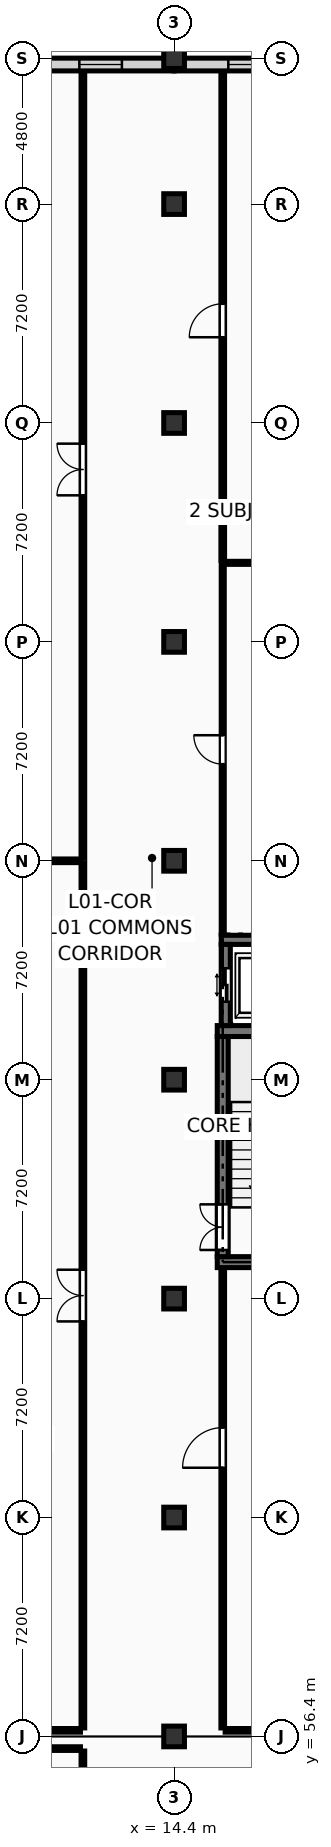
"""IFC4 building model, lengths in metres.
Left out: names, types, materials, properties, quantities, classifications, styles, units other than length and angle.
Written with IfcOpenShell. Run it as: python <this file> out.ifc"""

import sys

from ifc_helpers import new_model, si_unit, direction, frame, frame_2d, origin, origin_2d, place, context, subcontext, project, spatial, rectangle, extrude, element, fill, save


model = new_model("IFC4")
c1 = context("Model", 3, precision=1e-05, world=origin(), true_north=direction((0.0, 1.0)))
c2 = subcontext(c1, "Body", "Model", "MODEL_VIEW")
j1 = project(units=[si_unit("LENGTHUNIT", "METRE"), si_unit("PLANEANGLEUNIT", "RADIAN")], contexts=[c1])
p1 = place(None, origin())
s1 = spatial("IfcSite", under=j1, at=p1, CompositionType="ELEMENT")
p2 = place(p1, origin())
s2 = spatial("IfcBuilding", under=s1, at=p2, CompositionType="ELEMENT")
p3 = place(p2, frame((0.0, 0.0, 4.5)))
s3 = spatial("IfcBuildingStorey", under=s2, at=p3, CompositionType="ELEMENT", Elevation=4.5)
for number, where, z_axis, x_axis in (
    (1, (14.4, 56.4, 0.0), (0.0, 0.0, 1.0), (1.0, 0.0, 0.0)),
    (2, (14.4, 63.6, 0.0), (0.0, 0.0, 1.0), (1.0, 0.0, 0.0)),
    (3, (14.4, 70.8, 0.0), (0.0, 0.0, 1.0), (1.0, 0.0, 0.0)),
    (4, (14.4, 78.0, 0.0), (0.0, 0.0, 1.0), (1.0, 0.0, 0.0)),
    (5, (14.4, 85.2, 0.0), (0.0, 0.0, 1.0), (1.0, 0.0, 0.0)),
    (6, (14.4, 92.4, 0.0), (0.0, 0.0, 1.0), (1.0, 0.0, 0.0)),
    (7, (14.4, 99.6, 0.0), (0.0, 0.0, 1.0), (1.0, 0.0, 0.0)),
    (8, (14.4, 106.8, 0.0), (0.0, 0.0, 1.0), (1.0, 0.0, 0.0)),
    (9, (14.4, 111.6, 0.0), (0.0, 0.0, 1.0), (1.0, 0.0, 0.0)),
):
    element("IfcColumn", number, at=place(p3, frame(where, z_axis=z_axis, x_axis=x_axis)), inside=s3, PredefinedType="COLUMN", context=c2, shape_type="SweptSolid", body=[
        extrude(rectangle(XDim=0.68, YDim=0.68, at=origin_2d()), origin(), (0.0, 0.0, 1.0), 4.05),
    ])
p4 = place(p3, frame((7.2, 111.39, 0.0), z_axis=(0.0, 0.0, 1.0), x_axis=(1.0, 0.0, 0.0)))
e10 = element("IfcWall", 10, at=p4, inside=s3, PredefinedType="SOLIDWALL", context=c2, shape_type="SweptSolid", body=[
    extrude(rectangle(XDim=7.2, YDim=0.42, at=frame_2d((3.6, 0.0))), origin(), (0.0, 0.0, 1.0), 3.16),
])
p5 = place(p4, frame((1.717, 0.0, 0.45)))
e11 = element("IfcOpeningElement", 11, at=p5, cuts=e10, PredefinedType="OPENING", context=c2, shape_type="SweptSolid", body=[
    extrude(rectangle(XDim=1.4, YDim=2.38, at=frame_2d((0.7, 1.19))), frame((0.0, 0.222, 0.0), z_axis=(0.0, -1.0, 0.0), x_axis=(1.0, 0.0, 0.0)), (0.0, 0.0, 1.0), 0.444),
])
p6 = place(p4, frame((4.083, 0.0, 0.45)))
e12 = element("IfcOpeningElement", 12, at=p6, cuts=e10, PredefinedType="OPENING", context=c2, shape_type="SweptSolid", body=[
    extrude(rectangle(XDim=1.4, YDim=2.38, at=frame_2d((0.7, 1.19))), frame((0.0, 0.222, 0.0), z_axis=(0.0, -1.0, 0.0), x_axis=(1.0, 0.0, 0.0)), (0.0, 0.0, 1.0), 0.444),
])
p7 = place(p3, frame((14.4, 111.39, 0.0), z_axis=(0.0, 0.0, 1.0), x_axis=(1.0, 0.0, 0.0)))
e13 = element("IfcWall", 13, at=p7, inside=s3, PredefinedType="SOLIDWALL", context=c2, shape_type="SweptSolid", body=[
    extrude(rectangle(XDim=7.2, YDim=0.42, at=frame_2d((3.6, 0.0))), origin(), (0.0, 0.0, 1.0), 3.16),
])
p8 = place(p7, frame((1.783, 0.0, 0.45)))
e14 = element("IfcOpeningElement", 14, at=p8, cuts=e13, PredefinedType="OPENING", context=c2, shape_type="SweptSolid", body=[
    extrude(rectangle(XDim=1.3, YDim=2.35, at=frame_2d((0.65, 1.175))), frame((0.0, 0.222, 0.0), z_axis=(0.0, -1.0, 0.0), x_axis=(1.0, 0.0, 0.0)), (0.0, 0.0, 1.0), 0.444),
])
p9 = place(p7, frame((4.117, 0.0, 0.45)))
e15 = element("IfcOpeningElement", 15, at=p9, cuts=e13, PredefinedType="OPENING", context=c2, shape_type="SweptSolid", body=[
    extrude(rectangle(XDim=1.3, YDim=2.35, at=frame_2d((0.65, 1.175))), frame((0.0, 0.222, 0.0), z_axis=(0.0, -1.0, 0.0), x_axis=(1.0, 0.0, 0.0)), (0.0, 0.0, 1.0), 0.444),
])
for number, where, z_axis, x_axis in (
    (16, (15.82, 72.0, 0.0), (0.0, 0.0, 1.0), (1.0, 0.0, 0.0)),
    (17, (15.82, 79.6, 0.0), (0.0, 0.0, 1.0), (1.0, 0.0, 0.0)),
):
    element("IfcWall", number, at=place(p3, frame(where, z_axis=z_axis, x_axis=x_axis)), inside=s3, PredefinedType="SHEAR", context=c2, shape_type="SweptSolid", body=[
        extrude(rectangle(XDim=4.48, YDim=0.36, at=frame_2d((2.24, 0.0))), origin(), (0.0, 0.0, 1.0), 3.79),
    ])
p10 = place(p3, frame((16.0, 72.18, 0.0), z_axis=(0.0, 0.0, 1.0), x_axis=(0.0, 1.0, 0.0)))
e18 = element("IfcWall", 18, at=p10, inside=s3, PredefinedType="SHEAR", context=c2, shape_type="SweptSolid", body=[
    extrude(rectangle(XDim=7.24, YDim=0.36, at=frame_2d((3.62, 0.0))), origin(), (0.0, 0.0, 1.0), 3.79),
])
p11 = place(p10, frame((0.22, 0.0, 0.0)))
e19 = element("IfcOpeningElement", 19, at=p11, cuts=e18, PredefinedType="OPENING", context=c2, shape_type="SweptSolid", body=[
    extrude(rectangle(XDim=1.5, YDim=2.2, at=frame_2d((0.75, 1.1))), frame((0.0, 0.192, 0.0), z_axis=(0.0, -1.0, 0.0), x_axis=(1.0, 0.0, 0.0)), (0.0, 0.0, 1.0), 0.384),
])
p12 = place(p3, frame((15.95, 82.6, 0.0), z_axis=(0.0, 0.0, 1.0), x_axis=(1.0, 0.0, 0.0)))
e20 = element("IfcWall", 20, at=p12, inside=s3, PredefinedType="SHEAR", context=c2, shape_type="SweptSolid", body=[
    extrude(rectangle(XDim=2.7, YDim=0.3, at=frame_2d((1.35, 0.0))), origin(), (0.0, 0.0, 1.0), 3.79),
])
p13 = place(p3, frame((16.1, 79.78, 0.0), z_axis=(0.0, 0.0, 1.0), x_axis=(0.0, 1.0, 0.0)))
e21 = element("IfcWall", 21, at=p13, inside=s3, PredefinedType="SHEAR", context=c2, shape_type="SweptSolid", body=[
    extrude(rectangle(XDim=2.67, YDim=0.3, at=frame_2d((1.335, 0.0))), origin(), (0.0, 0.0, 1.0), 3.79),
])
p14 = place(p13, frame((0.785, 0.0, 0.0)))
e22 = element("IfcOpeningElement", 22, at=p14, cuts=e21, PredefinedType="OPENING", context=c2, shape_type="SweptSolid", body=[
    extrude(rectangle(XDim=1.1, YDim=2.2, at=frame_2d((0.55, 1.1))), frame((0.0, 0.162, 0.0), z_axis=(0.0, -1.0, 0.0), x_axis=(1.0, 0.0, 0.0)), (0.0, 0.0, 1.0), 0.324),
])
p15 = place(p3, frame((11.4, 38.48, 0.0), z_axis=(0.0, 0.0, 1.0), x_axis=(0.0, 1.0, 0.0)))
e23 = element("IfcWall", 23, at=p15, inside=s3, PredefinedType="PARTITIONING", context=c2, shape_type="SweptSolid", body=[
    extrude(rectangle(XDim=17.44, YDim=0.12, at=frame_2d((8.72, 0.0))), origin(), (0.0, 0.0, 1.0), 3.775),
])
p16 = place(p15, frame((8.06, 0.0, 0.0)))
e24 = element("IfcOpeningElement", 24, at=p16, cuts=e23, PredefinedType="OPENING", context=c2, shape_type="SweptSolid", body=[
    extrude(rectangle(XDim=1.32, YDim=2.2, at=frame_2d((0.66, 1.1))), frame((0.0, 0.072, 0.0), z_axis=(0.0, -1.0, 0.0), x_axis=(1.0, 0.0, 0.0)), (0.0, 0.0, 1.0), 0.144),
])
for number, where, z_axis, x_axis in (
    (25, (0.48, 56.0, 0.0), (0.0, 0.0, 1.0), (1.0, 0.0, 0.0)),
    (26, (0.48, 56.6, 0.0), (0.0, 0.0, 1.0), (1.0, 0.0, 0.0)),
):
    element("IfcWall", number, at=place(p3, frame(where, z_axis=z_axis, x_axis=x_axis)), inside=s3, PredefinedType="PARTITIONING", context=c2, shape_type="SweptSolid", body=[
        extrude(rectangle(XDim=10.84, YDim=0.12, at=frame_2d((5.42, 0.0))), origin(), (0.0, 0.0, 1.0), 3.025),
    ])
p17 = place(p3, frame((11.4, 56.68, 0.0), z_axis=(0.0, 0.0, 1.0), x_axis=(0.0, 1.0, 0.0)))
e27 = element("IfcWall", 27, at=p17, inside=s3, PredefinedType="PARTITIONING", context=c2, shape_type="SweptSolid", body=[
    extrude(rectangle(XDim=28.44, YDim=0.12, at=frame_2d((14.22, 0.0))), origin(), (0.0, 0.0, 1.0), 3.775),
])
p18 = place(p17, frame((13.37, 0.0, 0.0)))
e28 = element("IfcOpeningElement", 28, at=p18, cuts=e27, PredefinedType="OPENING", context=c2, shape_type="SweptSolid", body=[
    extrude(rectangle(XDim=1.7, YDim=2.28, at=frame_2d((0.85, 1.14))), frame((0.0, 0.072, 0.0), z_axis=(0.0, -1.0, 0.0), x_axis=(1.0, 0.0, 0.0)), (0.0, 0.0, 1.0), 0.144),
])
p19 = place(p3, frame((0.48, 85.2, 0.0), z_axis=(0.0, 0.0, 1.0), x_axis=(1.0, 0.0, 0.0)))
e29 = element("IfcWall", 29, at=p19, inside=s3, PredefinedType="PARTITIONING", context=c2, shape_type="SweptSolid", body=[
    extrude(rectangle(XDim=10.84, YDim=0.12, at=frame_2d((5.42, 0.0))), origin(), (0.0, 0.0, 1.0), 3.025),
])
p20 = place(p3, frame((11.4, 85.28, 0.0), z_axis=(0.0, 0.0, 1.0), x_axis=(0.0, 1.0, 0.0)))
e30 = element("IfcWall", 30, at=p20, inside=s3, PredefinedType="PARTITIONING", context=c2, shape_type="SweptSolid", body=[
    extrude(rectangle(XDim=25.84, YDim=0.12, at=frame_2d((12.92, 0.0))), origin(), (0.0, 0.0, 1.0), 3.775),
])
p21 = place(p20, frame((11.94, 0.0, 0.0)))
e31 = element("IfcOpeningElement", 31, at=p21, cuts=e30, PredefinedType="OPENING", context=c2, shape_type="SweptSolid", body=[
    extrude(rectangle(XDim=1.7, YDim=2.28, at=frame_2d((0.85, 1.14))), frame((0.0, 0.072, 0.0), z_axis=(0.0, -1.0, 0.0), x_axis=(1.0, 0.0, 0.0)), (0.0, 0.0, 1.0), 0.144),
])
p22 = place(p3, frame((16.0, 56.68, 0.0), z_axis=(0.0, 0.0, 1.0), x_axis=(0.0, 1.0, 0.0)))
e32 = element("IfcWall", 32, at=p22, inside=s3, PredefinedType="PARTITIONING", context=c2, shape_type="SweptSolid", body=[
    extrude(rectangle(XDim=15.1, YDim=0.12, at=frame_2d((7.55, 0.0))), origin(), (0.0, 0.0, 1.0), 3.775),
])
p23 = place(p22, frame((8.558, 0.0, 0.0)))
e33 = element("IfcOpeningElement", 33, at=p23, cuts=e32, PredefinedType="OPENING", context=c2, shape_type="SweptSolid", body=[
    extrude(rectangle(XDim=1.32, YDim=2.2, at=frame_2d((0.66, 1.1))), frame((0.0, 0.072, 0.0), z_axis=(0.0, -1.0, 0.0), x_axis=(1.0, 0.0, 0.0)), (0.0, 0.0, 1.0), 0.144),
])
p24 = place(p3, frame((16.08, 56.6, 0.0), z_axis=(0.0, 0.0, 1.0), x_axis=(1.0, 0.0, 0.0)))
e34 = element("IfcWall", 34, at=p24, inside=s3, PredefinedType="PARTITIONING", context=c2, shape_type="SweptSolid", body=[
    extrude(rectangle(XDim=12.24, YDim=0.12, at=frame_2d((6.12, 0.0))), origin(), (0.0, 0.0, 1.0), 3.025),
])
p25 = place(p3, frame((16.0, 82.79, 0.0), z_axis=(0.0, 0.0, 1.0), x_axis=(0.0, 1.0, 0.0)))
e35 = element("IfcWall", 35, at=p25, inside=s3, PredefinedType="PARTITIONING", context=c2, shape_type="SweptSolid", body=[
    extrude(rectangle(XDim=12.13, YDim=0.1, at=frame_2d((6.065, 0.0))), origin(), (0.0, 0.0, 1.0), 3.775),
])
p26 = place(p25, frame((5.59, 0.0, 0.0)))
e36 = element("IfcOpeningElement", 36, at=p26, cuts=e35, PredefinedType="OPENING", context=c2, shape_type="SweptSolid", body=[
    extrude(rectangle(XDim=0.95, YDim=2.1, at=frame_2d((0.475, 1.05))), frame((0.0, 0.062, 0.0), z_axis=(0.0, -1.0, 0.0), x_axis=(1.0, 0.0, 0.0)), (0.0, 0.0, 1.0), 0.124),
])
p27 = place(p3, frame((16.08, 95.0, 0.0), z_axis=(0.0, 0.0, 1.0), x_axis=(1.0, 0.0, 0.0)))
e37 = element("IfcWall", 37, at=p27, inside=s3, PredefinedType="PARTITIONING", context=c2, shape_type="SweptSolid", body=[
    extrude(rectangle(XDim=5.04, YDim=0.1, at=frame_2d((2.52, 0.0))), origin(), (0.0, 0.0, 1.0), 3.775),
])
p28 = place(p3, frame((16.0, 95.08, 0.0), z_axis=(0.0, 0.0, 1.0), x_axis=(0.0, 1.0, 0.0)))
e38 = element("IfcWall", 38, at=p28, inside=s3, PredefinedType="PARTITIONING", context=c2, shape_type="SweptSolid", body=[
    extrude(rectangle(XDim=16.04, YDim=0.12, at=frame_2d((8.02, 0.0))), origin(), (0.0, 0.0, 1.0), 3.775),
])
p29 = place(p28, frame((7.34, 0.0, 0.0)))
e39 = element("IfcOpeningElement", 39, at=p29, cuts=e38, PredefinedType="OPENING", context=c2, shape_type="SweptSolid", body=[
    extrude(rectangle(XDim=1.1, YDim=2.15, at=frame_2d((0.55, 1.075))), frame((0.0, 0.072, 0.0), z_axis=(0.0, -1.0, 0.0), x_axis=(1.0, 0.0, 0.0)), (0.0, 0.0, 1.0), 0.144),
])
p30 = place(p6, origin())
e40 = element("IfcWindow", 40, at=p30, inside=s3, PartitioningType="SINGLE_PANEL", PredefinedType="WINDOW", context=c2, shape_type="SweptSolid", body=[
    extrude(rectangle(XDim=1.4, YDim=2.38, at=frame_2d((0.7, 1.19))), frame((0.0, 0.03, 0.0), z_axis=(0.0, -1.0, 0.0), x_axis=(1.0, 0.0, 0.0)), (0.0, 0.0, 1.0), 0.06),
])
fill(e12, e40)
p31 = place(p8, origin())
e41 = element("IfcWindow", 41, at=p31, inside=s3, PartitioningType="SINGLE_PANEL", PredefinedType="WINDOW", context=c2, shape_type="SweptSolid", body=[
    extrude(rectangle(XDim=1.3, YDim=2.35, at=frame_2d((0.65, 1.175))), frame((0.0, 0.03, 0.0), z_axis=(0.0, -1.0, 0.0), x_axis=(1.0, 0.0, 0.0)), (0.0, 0.0, 1.0), 0.06),
])
fill(e14, e41)
p32 = place(p11, origin())
e42 = element("IfcDoor", 42, at=p32, inside=s3, OperationType="DOUBLE_DOOR_SINGLE_SWING", PredefinedType="DOOR", context=c2, shape_type="SweptSolid", body=[
    extrude(rectangle(XDim=1.5, YDim=2.2, at=frame_2d((0.75, 1.1))), frame((0.0, 0.025, 0.0), z_axis=(0.0, -1.0, 0.0), x_axis=(1.0, 0.0, 0.0)), (0.0, 0.0, 1.0), 0.05),
])
fill(e19, e42)
p33 = place(p14, origin())
e43 = element("IfcDoor", 43, at=p33, inside=s3, OperationType="DOUBLE_DOOR_SLIDING", PredefinedType="DOOR", context=c2, shape_type="SweptSolid", body=[
    extrude(rectangle(XDim=1.1, YDim=2.2, at=frame_2d((0.55, 1.1))), frame((0.0, 0.025, 0.0), z_axis=(0.0, -1.0, 0.0), x_axis=(1.0, 0.0, 0.0)), (0.0, 0.0, 1.0), 0.05),
])
fill(e22, e43)
p34 = place(p18, origin())
e44 = element("IfcDoor", 44, at=p34, inside=s3, OperationType="DOUBLE_DOOR_SINGLE_SWING", PredefinedType="DOOR", context=c2, shape_type="SweptSolid", body=[
    extrude(rectangle(XDim=1.7, YDim=2.28, at=frame_2d((0.85, 1.14))), frame((0.0, 0.025, 0.0), z_axis=(0.0, -1.0, 0.0), x_axis=(1.0, 0.0, 0.0)), (0.0, 0.0, 1.0), 0.05),
])
fill(e28, e44)
p35 = place(p21, origin())
e45 = element("IfcDoor", 45, at=p35, inside=s3, OperationType="DOUBLE_DOOR_SINGLE_SWING", PredefinedType="DOOR", context=c2, shape_type="SweptSolid", body=[
    extrude(rectangle(XDim=1.7, YDim=2.28, at=frame_2d((0.85, 1.14))), frame((0.0, 0.025, 0.0), z_axis=(0.0, -1.0, 0.0), x_axis=(1.0, 0.0, 0.0)), (0.0, 0.0, 1.0), 0.05),
])
fill(e31, e45)
p36 = place(p23, origin())
e46 = element("IfcDoor", 46, at=p36, inside=s3, OperationType="SINGLE_SWING_LEFT", PredefinedType="DOOR", context=c2, shape_type="SweptSolid", body=[
    extrude(rectangle(XDim=1.32, YDim=2.2, at=frame_2d((0.66, 1.1))), frame((0.0, 0.025, 0.0), z_axis=(0.0, -1.0, 0.0), x_axis=(1.0, 0.0, 0.0)), (0.0, 0.0, 1.0), 0.05),
])
fill(e33, e46)
p37 = place(p26, origin())
e47 = element("IfcDoor", 47, at=p37, inside=s3, OperationType="SINGLE_SWING_RIGHT", PredefinedType="DOOR", context=c2, shape_type="SweptSolid", body=[
    extrude(rectangle(XDim=0.95, YDim=2.1, at=frame_2d((0.475, 1.05))), frame((0.0, 0.025, 0.0), z_axis=(0.0, -1.0, 0.0), x_axis=(1.0, 0.0, 0.0)), (0.0, 0.0, 1.0), 0.05),
])
fill(e36, e47)
p38 = place(p29, origin())
e48 = element("IfcDoor", 48, at=p38, inside=s3, OperationType="SINGLE_SWING_LEFT", PredefinedType="DOOR", context=c2, shape_type="SweptSolid", body=[
    extrude(rectangle(XDim=1.1, YDim=2.15, at=frame_2d((0.55, 1.075))), frame((0.0, 0.025, 0.0), z_axis=(0.0, -1.0, 0.0), x_axis=(1.0, 0.0, 0.0)), (0.0, 0.0, 1.0), 0.05),
])
fill(e39, e48)
save(model, sys.argv[1])
